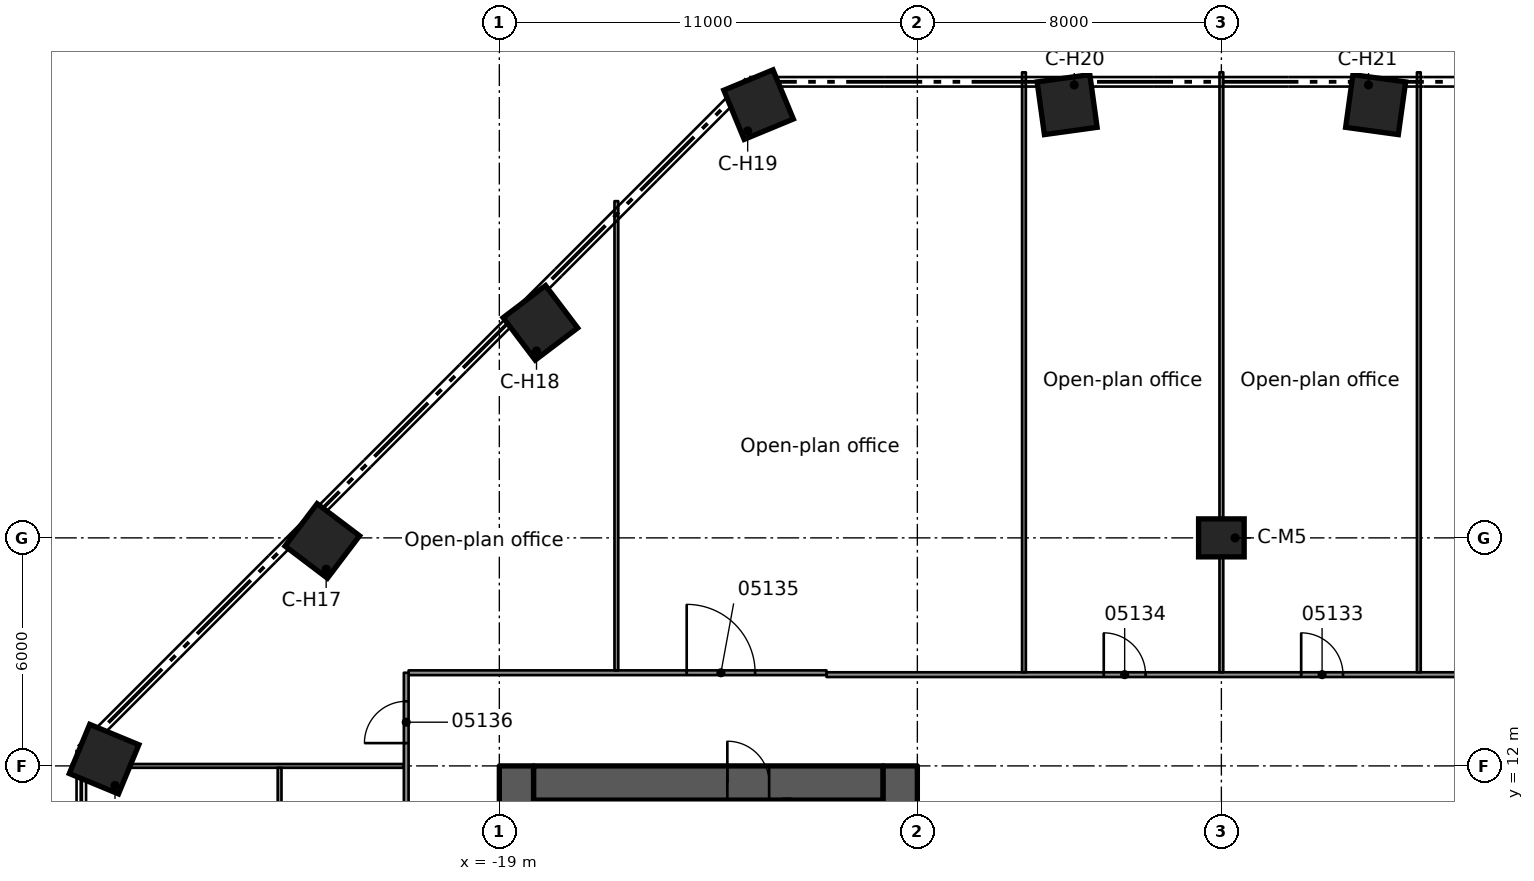
"""IFC4 building model, lengths in metres.
Left out: names, types, materials, properties, quantities, classifications, styles, units other than length and angle.
Written with IfcOpenShell. Run it as: python <this file> out.ifc"""

import sys

from ifc_helpers import new_model, si_unit, direction, frame, frame_2d, origin, origin_2d, place, context, subcontext, project, spatial, rectangle, extrude, element, fill, save


model = new_model("IFC4")
c1 = context("Model", 3, precision=1e-05, world=origin(), true_north=direction((0.0, 1.0)))
c2 = subcontext(c1, "Body", "Model", "MODEL_VIEW")
j1 = project(units=[si_unit("LENGTHUNIT", "METRE"), si_unit("PLANEANGLEUNIT", "RADIAN")], contexts=[c1])
p1 = place(None, origin())
s1 = spatial("IfcSite", under=j1, at=p1, CompositionType="ELEMENT")
p2 = place(p1, origin())
s2 = spatial("IfcBuilding", under=s1, at=p2, CompositionType="ELEMENT")
p3 = place(p2, frame((0.0, 0.0, 25.1)))
s3 = spatial("IfcBuildingStorey", under=s2, at=p3, CompositionType="ELEMENT", Elevation=25.1)
p4 = place(p3, frame((-18.1, 11.55, 0.0), z_axis=(0.0, 0.0, 1.0), x_axis=(1.0, 0.0, 0.0)))
e1 = element("IfcWall", 1, at=p4, inside=s3, PredefinedType="SHEAR", context=c2, shape_type="SweptSolid", body=[
    extrude(rectangle(XDim=9.2, YDim=0.9, at=frame_2d((4.6, 0.0))), origin(), (0.0, 0.0, 1.0), 4.1),
])
p5 = place(p4, frame((5.1, 0.0, 0.0)))
e2 = element("IfcOpeningElement", 2, at=p5, cuts=e1, PredefinedType="OPENING", context=c2, shape_type="SweptSolid", body=[
    extrude(rectangle(XDim=1.1, YDim=2.1, at=frame_2d((0.55, 1.05))), frame((0.0, 0.46, 0.0), z_axis=(0.0, -1.0, 0.0), x_axis=(1.0, 0.0, 0.0)), (0.0, 0.0, 1.0), 0.92),
])
p6 = place(p3, frame((-18.55, -12.0, 0.0), z_axis=(0.0, 0.0, 1.0), x_axis=(0.0, 1.0, 0.0)))
e3 = element("IfcWall", 3, at=p6, inside=s3, PredefinedType="SHEAR", context=c2, shape_type="SweptSolid", body=[
    extrude(rectangle(XDim=24.0, YDim=0.9, at=frame_2d((12.0, 0.0))), origin(), (0.0, 0.0, 1.0), 4.1),
])
p7 = place(p6, frame((10.1, 0.0, 0.0)))
e4 = element("IfcOpeningElement", 4, at=p7, cuts=e3, PredefinedType="OPENING", context=c2, shape_type="SweptSolid", body=[
    extrude(rectangle(XDim=1.8, YDim=2.1, at=frame_2d((0.9, 1.05))), frame((0.0, 0.46, 0.0), z_axis=(0.0, -1.0, 0.0), x_axis=(1.0, 0.0, 0.0)), (0.0, 0.0, 1.0), 0.92),
])
p8 = place(p3, frame((-8.45, -12.0, 0.0), z_axis=(0.0, 0.0, 1.0), x_axis=(0.0, 1.0, 0.0)))
e5 = element("IfcWall", 5, at=p8, inside=s3, PredefinedType="SHEAR", context=c2, shape_type="SweptSolid", body=[
    extrude(rectangle(XDim=24.0, YDim=0.9, at=frame_2d((12.0, 0.0))), origin(), (0.0, 0.0, 1.0), 4.1),
])
p9 = place(p8, frame((9.6, 0.0, 0.0)))
e6 = element("IfcOpeningElement", 6, at=p9, cuts=e5, PredefinedType="OPENING", context=c2, shape_type="SweptSolid", body=[
    extrude(rectangle(XDim=1.8, YDim=2.1, at=frame_2d((0.9, 1.05))), frame((0.0, 0.46, 0.0), z_axis=(0.0, -1.0, 0.0), x_axis=(1.0, 0.0, 0.0)), (0.0, 0.0, 1.0), 0.92),
])
p10 = place(p8, frame((19.65, 0.0, 0.0)))
e7 = element("IfcOpeningElement", 7, at=p10, cuts=e5, PredefinedType="OPENING", context=c2, shape_type="SweptSolid", body=[
    extrude(rectangle(XDim=1.1, YDim=2.1, at=frame_2d((0.55, 1.05))), frame((0.0, 0.46, 0.0), z_axis=(0.0, -1.0, 0.0), x_axis=(1.0, 0.0, 0.0)), (0.0, 0.0, 1.0), 0.92),
])
for number, where, z_axis, x_axis in (
    (8, (-29.4, 12.178, 0.0), (0.0, 0.0, 1.0), (-0.924, 0.383, 0.0)),
    (9, (-23.659, 17.919, 0.0), (0.0, 0.0, 1.0), (-0.797, 0.604, 0.0)),
    (10, (-17.919, 23.659, 0.0), (0.0, 0.0, 1.0), (-0.604, 0.797, 0.0)),
    (11, (-12.178, 29.4, 0.0), (0.0, 0.0, 1.0), (-0.383, 0.924, 0.0)),
    (12, (-4.059, 29.4, 0.0), (0.0, 0.0, 1.0), (-0.137, 0.991, 0.0)),
    (13, (4.059, 29.4, 0.0), (0.0, 0.0, 1.0), (0.137, 0.991, 0.0)),
):
    element("IfcColumn", number, at=place(p3, frame(where, z_axis=z_axis, x_axis=x_axis)), inside=s3, PredefinedType="COLUMN", context=c2, shape_type="SweptSolid", body=[
        extrude(rectangle(XDim=1.4, YDim=1.4, at=origin_2d()), origin(), (0.0, 0.0, 1.0), 4.1),
    ])
p11 = place(p3, frame((0.0, 18.0, 0.0), z_axis=(0.0, 0.0, 1.0), x_axis=(1.0, 0.0, 0.0)))
e14 = element("IfcColumn", 14, at=p11, inside=s3, PredefinedType="COLUMN", context=c2, shape_type="SweptSolid", body=[
    extrude(rectangle(XDim=1.2, YDim=1.0, at=origin_2d()), origin(), (0.0, 0.0, 1.0), 4.1),
])
p12 = place(p3, frame((-11.44, 6.975, 0.0), z_axis=(0.0, 0.0, 1.0), x_axis=(0.0, 1.0, 0.0)))
e15 = element("IfcWall", 15, at=p12, inside=s3, PredefinedType="SOLIDWALL", context=c2, shape_type="SweptSolid", body=[
    extrude(rectangle(XDim=4.125, YDim=0.2, at=frame_2d((2.062, 0.0))), origin(), (0.0, 0.0, 1.0), 3.69),
])
p13 = place(p12, frame((2.1, 0.0, 0.0)))
e16 = element("IfcOpeningElement", 16, at=p13, cuts=e15, PredefinedType="OPENING", context=c2, shape_type="SweptSolid", body=[
    extrude(rectangle(XDim=1.1, YDim=2.1, at=frame_2d((0.55, 1.05))), frame((0.0, 0.11, 0.0), z_axis=(0.0, -1.0, 0.0), x_axis=(1.0, 0.0, 0.0)), (0.0, 0.0, 1.0), 0.22),
])
p14 = place(p3, frame((-30.25, 12.0, 0.0), z_axis=(0.0, 0.0, 1.0), x_axis=(1.0, 0.0, 0.0)))
e17 = element("IfcWall", 17, at=p14, inside=s3, PredefinedType="PARTITIONING", context=c2, shape_type="SweptSolid", body=[
    extrude(rectangle(XDim=8.738, YDim=0.1, at=frame_2d((4.369, 0.0))), origin(), (0.0, 0.0, 1.0), 3.68),
])
p15 = place(p3, frame((-10.39, 14.401, 0.0), z_axis=(0.0, 0.0, 1.0), x_axis=(1.0, 0.0, 0.0)))
e18 = element("IfcWall", 18, at=p15, inside=s3, PredefinedType="PARTITIONING", context=c2, shape_type="SweptSolid", body=[
    extrude(rectangle(XDim=20.781, YDim=0.125, at=frame_2d((10.391, 0.0))), origin(), (0.0, 0.0, 1.0), 3.68),
])
p16 = place(p15, frame((12.49, 0.0, 0.0)))
e19 = element("IfcOpeningElement", 19, at=p16, cuts=e18, PredefinedType="OPENING", context=c2, shape_type="SweptSolid", body=[
    extrude(rectangle(XDim=1.1, YDim=2.1, at=frame_2d((0.55, 1.05))), frame((0.0, 0.073, 0.0), z_axis=(0.0, -1.0, 0.0), x_axis=(1.0, 0.0, 0.0)), (0.0, 0.0, 1.0), 0.145),
])
p17 = place(p15, frame((7.295, 0.0, 0.0)))
e20 = element("IfcOpeningElement", 20, at=p17, cuts=e18, PredefinedType="OPENING", context=c2, shape_type="SweptSolid", body=[
    extrude(rectangle(XDim=1.1, YDim=2.1, at=frame_2d((0.55, 1.05))), frame((0.0, 0.073, 0.0), z_axis=(0.0, -1.0, 0.0), x_axis=(1.0, 0.0, 0.0)), (0.0, 0.0, 1.0), 0.145),
])
p18 = place(p3, frame((-21.387, 14.451, 0.0), z_axis=(0.0, 0.0, 1.0), x_axis=(1.0, 0.0, 0.0)))
e21 = element("IfcWall", 21, at=p18, inside=s3, PredefinedType="PARTITIONING", context=c2, shape_type="SweptSolid", body=[
    extrude(rectangle(XDim=10.996, YDim=0.125, at=frame_2d((5.498, 0.0))), origin(), (0.0, 0.0, 1.0), 3.68),
])
p19 = place(p18, frame((7.317, 0.0, 0.0)))
e22 = element("IfcOpeningElement", 22, at=p19, cuts=e21, PredefinedType="OPENING", context=c2, shape_type="SweptSolid", body=[
    extrude(rectangle(XDim=1.8, YDim=2.1, at=frame_2d((0.9, 1.05))), frame((0.0, 0.073, 0.0), z_axis=(0.0, -1.0, 0.0), x_axis=(1.0, 0.0, 0.0)), (0.0, 0.0, 1.0), 0.145),
])
for number, where, z_axis, x_axis in (
    (23, (5.196, 14.463, 0.0), (0.0, 0.0, 1.0), (0.0, 1.0, 0.0)),
    (24, (0.0, 14.463, 0.0), (0.0, 0.0, 1.0), (0.0, 1.0, 0.0)),
    (25, (-5.195, 14.463, 0.0), (0.0, 0.0, 1.0), (0.0, 1.0, 0.0)),
):
    element("IfcWall", number, at=place(p3, frame(where, z_axis=z_axis, x_axis=x_axis)), inside=s3, PredefinedType="PARTITIONING", context=c2, shape_type="SweptSolid", body=[
        extrude(rectangle(XDim=15.787, YDim=0.1, at=frame_2d((7.894, 0.0))), origin(), (0.0, 0.0, 1.0), 3.68),
    ])
p20 = place(p3, frame((-15.92, 14.514, 0.0), z_axis=(0.0, 0.0, 1.0), x_axis=(0.0, 1.0, 0.0)))
e26 = element("IfcWall", 26, at=p20, inside=s3, PredefinedType="PARTITIONING", context=c2, shape_type="SweptSolid", body=[
    extrude(rectangle(XDim=12.346, YDim=0.1, at=frame_2d((6.173, 0.0))), origin(), (0.0, 0.0, 1.0), 3.68),
])
p21 = place(p3, frame((-21.45, -11.607, 0.0), z_axis=(0.0, 0.0, 1.0), x_axis=(0.0, 1.0, 0.0)))
e27 = element("IfcWall", 27, at=p21, inside=s3, PredefinedType="PARTITIONING", context=c2, shape_type="SweptSolid", body=[
    extrude(rectangle(XDim=26.058, YDim=0.125, at=frame_2d((13.029, 0.0))), origin(), (0.0, 0.0, 1.0), 3.68),
])
p22 = place(p21, frame((5.1, 0.0, 0.0)))
e28 = element("IfcOpeningElement", 28, at=p22, cuts=e27, PredefinedType="OPENING", context=c2, shape_type="SweptSolid", body=[
    extrude(rectangle(XDim=1.8, YDim=2.1, at=frame_2d((0.9, 1.05))), frame((0.0, 0.073, 0.0), z_axis=(0.0, -1.0, 0.0), x_axis=(1.0, 0.0, 0.0)), (0.0, 0.0, 1.0), 0.145),
])
p23 = place(p21, frame((24.207, 0.0, 0.0)))
e29 = element("IfcOpeningElement", 29, at=p23, cuts=e27, PredefinedType="OPENING", context=c2, shape_type="SweptSolid", body=[
    extrude(rectangle(XDim=1.1, YDim=2.1, at=frame_2d((0.55, 1.05))), frame((0.0, 0.073, 0.0), z_axis=(0.0, -1.0, 0.0), x_axis=(1.0, 0.0, 0.0)), (0.0, 0.0, 1.0), 0.145),
])
p24 = place(p21, frame((14.153, 0.0, 0.0)))
e30 = element("IfcOpeningElement", 30, at=p24, cuts=e27, PredefinedType="OPENING", context=c2, shape_type="SweptSolid", body=[
    extrude(rectangle(XDim=1.1, YDim=2.1, at=frame_2d((0.55, 1.05))), frame((0.0, 0.073, 0.0), z_axis=(0.0, -1.0, 0.0), x_axis=(1.0, 0.0, 0.0)), (0.0, 0.0, 1.0), 0.145),
])
p25 = place(p21, frame((19.958, 0.0, 0.0)))
e31 = element("IfcOpeningElement", 31, at=p25, cuts=e27, PredefinedType="OPENING", context=c2, shape_type="SweptSolid", body=[
    extrude(rectangle(XDim=1.1, YDim=2.1, at=frame_2d((0.55, 1.05))), frame((0.0, 0.073, 0.0), z_axis=(0.0, -1.0, 0.0), x_axis=(1.0, 0.0, 0.0)), (0.0, 0.0, 1.0), 0.145),
])
p26 = place(p3, frame((-24.782, 6.001, 0.0), z_axis=(0.0, 0.0, 1.0), x_axis=(0.0, 1.0, 0.0)))
e32 = element("IfcWall", 32, at=p26, inside=s3, PredefinedType="PARTITIONING", context=c2, shape_type="SweptSolid", body=[
    extrude(rectangle(XDim=5.949, YDim=0.1, at=frame_2d((2.975, 0.0))), origin(), (0.0, 0.0, 1.0), 3.68),
])
p27 = place(p5, origin())
e33 = element("IfcDoor", 33, at=p27, inside=s3, OperationType="SINGLE_SWING_RIGHT", PredefinedType="DOOR", context=c2, shape_type="SweptSolid", body=[
    extrude(rectangle(XDim=1.1, YDim=2.1, at=frame_2d((0.55, 1.05))), frame((0.0, 0.025, 0.0), z_axis=(0.0, -1.0, 0.0), x_axis=(1.0, 0.0, 0.0)), (0.0, 0.0, 1.0), 0.05),
])
fill(e2, e33)
p28 = place(p16, origin())
e34 = element("IfcDoor", 34, at=p28, inside=s3, OperationType="SINGLE_SWING_RIGHT", PredefinedType="DOOR", context=c2, shape_type="SweptSolid", body=[
    extrude(rectangle(XDim=1.1, YDim=2.1, at=frame_2d((0.55, 1.05))), frame((0.0, 0.025, 0.0), z_axis=(0.0, -1.0, 0.0), x_axis=(1.0, 0.0, 0.0)), (0.0, 0.0, 1.0), 0.05),
])
fill(e19, e34)
p29 = place(p17, origin())
e35 = element("IfcDoor", 35, at=p29, inside=s3, OperationType="SINGLE_SWING_LEFT", PredefinedType="DOOR", context=c2, shape_type="SweptSolid", body=[
    extrude(rectangle(XDim=1.1, YDim=2.1, at=frame_2d((0.55, 1.05))), frame((0.0, 0.025, 0.0), z_axis=(0.0, -1.0, 0.0), x_axis=(1.0, 0.0, 0.0)), (0.0, 0.0, 1.0), 0.05),
])
fill(e20, e35)
p30 = place(p19, origin())
e36 = element("IfcDoor", 36, at=p30, inside=s3, OperationType="DOUBLE_DOOR_SINGLE_SWING", PredefinedType="DOOR", context=c2, shape_type="SweptSolid", body=[
    extrude(rectangle(XDim=1.8, YDim=2.1, at=frame_2d((0.9, 1.05))), frame((0.0, 0.025, 0.0), z_axis=(0.0, -1.0, 0.0), x_axis=(1.0, 0.0, 0.0)), (0.0, 0.0, 1.0), 0.05),
])
fill(e22, e36)
p31 = place(p23, origin())
e37 = element("IfcDoor", 37, at=p31, inside=s3, OperationType="SINGLE_SWING_RIGHT", PredefinedType="DOOR", context=c2, shape_type="SweptSolid", body=[
    extrude(rectangle(XDim=1.1, YDim=2.1, at=frame_2d((0.55, 1.05))), frame((0.0, 0.025, 0.0), z_axis=(0.0, -1.0, 0.0), x_axis=(1.0, 0.0, 0.0)), (0.0, 0.0, 1.0), 0.05),
])
fill(e29, e37)
save(model, sys.argv[1])
